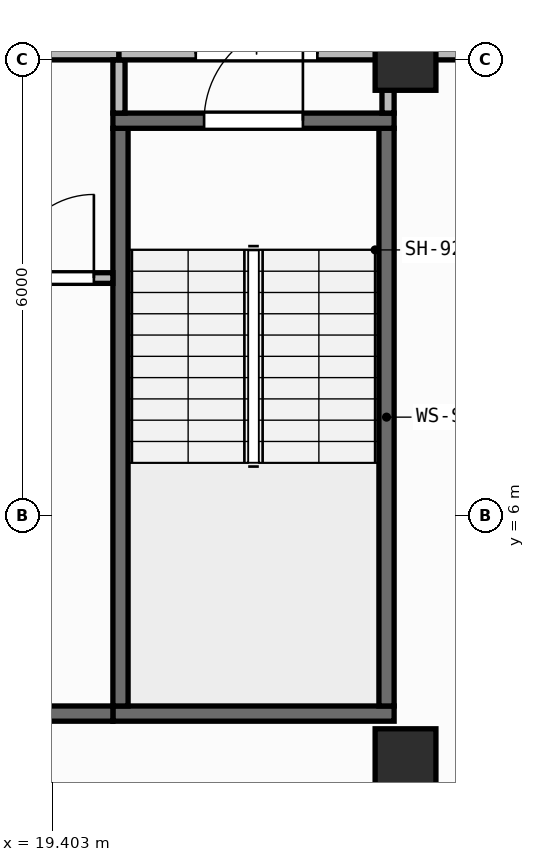
"""IFC4 building model, lengths in metres.
Left out: names, types, materials, properties, quantities, classifications, styles, units other than length and angle.
Written with IfcOpenShell. Run it as: python <this file> out.ifc"""

import sys

from ifc_helpers import new_model, si_unit, direction, frame, frame_2d, origin, origin_2d, place, context, subcontext, project, spatial, rectangle, extrude, element, fill, save


model = new_model("IFC4")
c1 = context("Model", 3, precision=1e-05, world=origin(), true_north=direction((0.0, 1.0)))
c2 = subcontext(c1, "Body", "Model", "MODEL_VIEW")
j1 = project(units=[si_unit("LENGTHUNIT", "METRE"), si_unit("PLANEANGLEUNIT", "RADIAN")], contexts=[c1])
p1 = place(None, origin())
s1 = spatial("IfcSite", under=j1, at=p1, CompositionType="ELEMENT")
p2 = place(p1, origin())
s2 = spatial("IfcBuilding", under=s1, at=p2, CompositionType="ELEMENT")
p3 = place(p2, frame((0.0, 0.0, 272.35)))
s3 = spatial("IfcBuildingStorey", under=s2, at=p3, CompositionType="ELEMENT", Elevation=272.35)
for number, where, z_axis, x_axis in (
    (1, (24.05, 2.8, 0.0), (0.0, 0.0, 1.0), (1.0, 0.0, 0.0)),
    (2, (24.05, 12.0, 0.0), (0.0, 0.0, 1.0), (1.0, 0.0, 0.0)),
):
    element("IfcColumn", number, at=place(p3, frame(where, z_axis=z_axis, x_axis=x_axis)), inside=s3, PredefinedType="COLUMN", context=c2, shape_type="SweptSolid", body=[
        extrude(rectangle(XDim=0.8, YDim=0.8, at=origin_2d()), origin(), (0.0, 0.0, 1.0), 3.95),
    ])
p4 = place(p3, frame((2.46, 0.172, 0.0), z_axis=(0.0, 0.0, 1.0), x_axis=(0.997289775118, 0.073573802713, 0.0)))
e3 = element("IfcWall", 3, at=p4, inside=s3, PredefinedType="STANDARD", context=c2, shape_type="SweptSolid", body=[
    extrude(rectangle(XDim=36.379, YDim=0.26, at=frame_2d((18.189, 0.0))), origin(), (0.0, 0.0, 1.0), 3.71),
])
p5 = place(p4, frame((16.989, 0.0, 0.9)))
e4 = element("IfcOpeningElement", 4, at=p5, cuts=e3, PredefinedType="OPENING", context=c2, shape_type="SweptSolid", body=[
    extrude(rectangle(XDim=2.4, YDim=1.65, at=frame_2d((1.2, 0.825))), frame((0.0, 0.14, 0.0), z_axis=(0.0, -1.0, 0.0), x_axis=(1.0, 0.0, 0.0)), (0.0, 0.0, 1.0), 0.28),
])
p6 = place(p3, frame((20.2, 3.4, 0.0), z_axis=(0.0, 0.0, 1.0), x_axis=(1.0, 0.0, 0.0)))
e5 = element("IfcWall", 5, at=p6, inside=s3, PredefinedType="SHEAR", context=c2, shape_type="SweptSolid", body=[
    extrude(rectangle(XDim=3.7, YDim=0.2, at=frame_2d((1.85, 0.0))), origin(), (0.0, 0.0, 1.0), 3.71),
])
for number, where, z_axis, x_axis in (
    (6, (20.3, 3.5, 0.0), (0.0, 0.0, 1.0), (0.0, 1.0, 0.0)),
    (7, (23.8, 3.5, 0.0), (0.0, 0.0, 1.0), (0.0, 1.0, 0.0)),
):
    element("IfcWall", number, at=place(p3, frame(where, z_axis=z_axis, x_axis=x_axis)), inside=s3, PredefinedType="SHEAR", context=c2, shape_type="SweptSolid", body=[
        extrude(rectangle(XDim=7.6, YDim=0.2, at=frame_2d((3.8, 0.0))), origin(), (0.0, 0.0, 1.0), 3.71),
    ])
p7 = place(p3, frame((20.2, 11.2, 0.0), z_axis=(0.0, 0.0, 1.0), x_axis=(1.0, 0.0, 0.0)))
e8 = element("IfcWall", 8, at=p7, inside=s3, PredefinedType="SHEAR", context=c2, shape_type="SweptSolid", body=[
    extrude(rectangle(XDim=3.7, YDim=0.2, at=frame_2d((1.85, 0.0))), origin(), (0.0, 0.0, 1.0), 3.71),
])
p8 = place(p7, frame((1.2, 0.0, 0.0)))
e9 = element("IfcOpeningElement", 9, at=p8, cuts=e8, PredefinedType="OPENING", context=c2, shape_type="SweptSolid", body=[
    extrude(rectangle(XDim=1.3, YDim=2.15, at=frame_2d((0.65, 1.075))), frame((0.0, 0.11, 0.0), z_axis=(0.0, -1.0, 0.0), x_axis=(1.0, 0.0, 0.0)), (0.0, 0.0, 1.0), 0.22),
])
p9 = place(p3, frame((6.5, 3.4, 0.0), z_axis=(0.0, 0.0, 1.0), x_axis=(1.0, 0.0, 0.0)))
e10 = element("IfcWall", 10, at=p9, inside=s3, PredefinedType="SHEAR", context=c2, shape_type="SweptSolid", body=[
    extrude(rectangle(XDim=13.7, YDim=0.2, at=frame_2d((6.85, 0.0))), origin(), (0.0, 0.0, 1.0), 3.71),
])
p10 = place(p3, frame((18.61, 9.13, 0.0), z_axis=(0.0, 0.0, 1.0), x_axis=(1.0, 0.0, 0.0)))
e11 = element("IfcWall", 11, at=p10, inside=s3, PredefinedType="PARTITIONING", context=c2, shape_type="SweptSolid", body=[
    extrude(rectangle(XDim=1.59, YDim=0.14, at=frame_2d((0.795, 0.0))), origin(), (0.0, 0.0, 1.0), 3.71),
])
p11 = place(p10, frame((0.24, 0.0, 0.0)))
e12 = element("IfcOpeningElement", 12, at=p11, cuts=e11, PredefinedType="OPENING", context=c2, shape_type="SweptSolid", body=[
    extrude(rectangle(XDim=1.1, YDim=2.1, at=frame_2d((0.55, 1.05))), frame((0.0, 0.08, 0.0), z_axis=(0.0, -1.0, 0.0), x_axis=(1.0, 0.0, 0.0)), (0.0, 0.0, 1.0), 0.16),
])
p12 = place(p3, frame((12.58, 12.08, 0.0), z_axis=(0.0, 0.0, 1.0), x_axis=(1.0, 0.0, 0.0)))
e13 = element("IfcWall", 13, at=p12, inside=s3, PredefinedType="PARTITIONING", context=c2, shape_type="SweptSolid", body=[
    extrude(rectangle(XDim=7.7, YDim=0.16, at=frame_2d((3.85, 0.0))), origin(), (0.0, 0.0, 1.0), 3.157),
])
p13 = place(p12, frame((3.05, 0.0, 0.0)))
e14 = element("IfcOpeningElement", 14, at=p13, cuts=e13, PredefinedType="OPENING", context=c2, shape_type="SweptSolid", body=[
    extrude(rectangle(XDim=1.6, YDim=2.05, at=frame_2d((0.8, 1.025))), frame((0.0, 0.09, 0.0), z_axis=(0.0, -1.0, 0.0), x_axis=(1.0, 0.0, 0.0)), (0.0, 0.0, 1.0), 0.18),
])
p14 = place(p3, frame((20.28, 11.3, 0.0), z_axis=(0.0, 0.0, 1.0), x_axis=(0.0, 1.0, 0.0)))
e15 = element("IfcWall", 15, at=p14, inside=s3, PredefinedType="PARTITIONING", context=c2, shape_type="SweptSolid", body=[
    extrude(rectangle(XDim=0.7, YDim=0.16, at=frame_2d((0.35, 0.0))), origin(), (0.0, 0.0, 1.0), 3.71),
])
p15 = place(p3, frame((20.28, 12.08, 0.0), z_axis=(0.0, 0.0, 1.0), x_axis=(1.0, 0.0, 0.0)))
e16 = element("IfcWall", 16, at=p15, inside=s3, PredefinedType="PARTITIONING", context=c2, shape_type="SweptSolid", body=[
    extrude(rectangle(XDim=3.62, YDim=0.16, at=frame_2d((1.81, 0.0))), origin(), (0.0, 0.0, 1.0), 3.157),
])
p16 = place(p15, frame((1.01, 0.0, 0.0)))
e17 = element("IfcOpeningElement", 17, at=p16, cuts=e16, PredefinedType="OPENING", context=c2, shape_type="SweptSolid", body=[
    extrude(rectangle(XDim=1.6, YDim=2.05, at=frame_2d((0.8, 1.025))), frame((0.0, 0.09, 0.0), z_axis=(0.0, -1.0, 0.0), x_axis=(1.0, 0.0, 0.0)), (0.0, 0.0, 1.0), 0.18),
])
p17 = place(p3, frame((23.82, 11.3, 0.0), z_axis=(0.0, 0.0, 1.0), x_axis=(0.0, 1.0, 0.0)))
e18 = element("IfcWall", 18, at=p17, inside=s3, PredefinedType="PARTITIONING", context=c2, shape_type="SweptSolid", body=[
    extrude(rectangle(XDim=0.7, YDim=0.16, at=frame_2d((0.35, 0.0))), origin(), (0.0, 0.0, 1.0), 3.71),
])
p18 = place(p3, frame((24.02, 12.08, 0.0), z_axis=(0.0, 0.0, 1.0), x_axis=(1.0, 0.0, 0.0)))
e19 = element("IfcWall", 19, at=p18, inside=s3, PredefinedType="PARTITIONING", context=c2, shape_type="SweptSolid", body=[
    extrude(rectangle(XDim=1.218, YDim=0.16, at=frame_2d((0.609, 0.0))), origin(), (0.0, 0.0, 1.0), 3.157),
])
p19 = place(p8, origin())
e20 = element("IfcDoor", 20, at=p19, inside=s3, OperationType="SINGLE_SWING_RIGHT", PredefinedType="DOOR", context=c2, shape_type="SweptSolid", body=[
    extrude(rectangle(XDim=1.3, YDim=2.15, at=frame_2d((0.65, 1.075))), frame((0.0, 0.025, 0.0), z_axis=(0.0, -1.0, 0.0), x_axis=(1.0, 0.0, 0.0)), (0.0, 0.0, 1.0), 0.05),
])
fill(e9, e20)
p20 = place(p11, origin())
e21 = element("IfcDoor", 21, at=p20, inside=s3, OperationType="SINGLE_SWING_RIGHT", PredefinedType="DOOR", context=c2, shape_type="SweptSolid", body=[
    extrude(rectangle(XDim=1.1, YDim=2.1, at=frame_2d((0.55, 1.05))), frame((0.0, 0.025, 0.0), z_axis=(0.0, -1.0, 0.0), x_axis=(1.0, 0.0, 0.0)), (0.0, 0.0, 1.0), 0.05),
])
fill(e12, e21)
p21 = place(p16, origin())
e22 = element("IfcDoor", 22, at=p21, inside=s3, OperationType="DOUBLE_DOOR_SINGLE_SWING", PredefinedType="DOOR", context=c2, shape_type="SweptSolid", body=[
    extrude(rectangle(XDim=1.6, YDim=2.05, at=frame_2d((0.8, 1.025))), frame((0.0, 0.025, 0.0), z_axis=(0.0, -1.0, 0.0), x_axis=(1.0, 0.0, 0.0)), (0.0, 0.0, 1.0), 0.05),
])
fill(e17, e22)
save(model, sys.argv[1])
